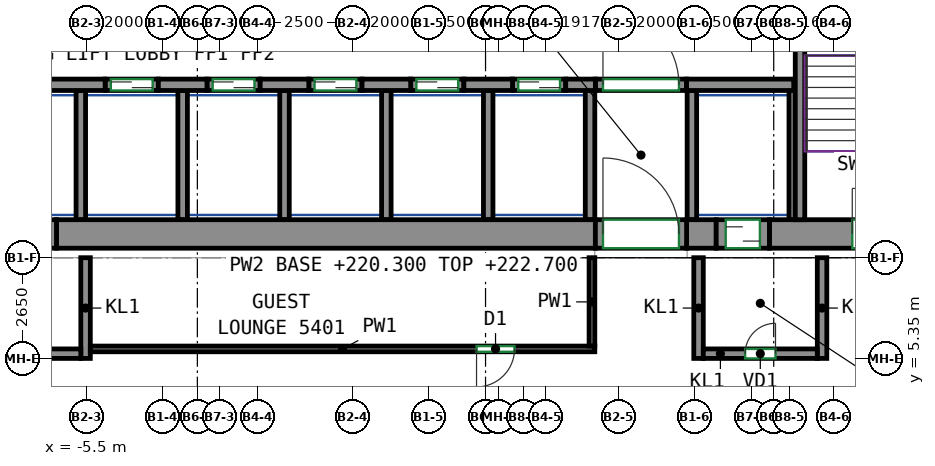
"""IFC4 building model, lengths in metres.
Left out: names, types, materials, properties, quantities, classifications, styles, units other than length and angle.
Written with IfcOpenShell. Run it as: python <this file> out.ifc"""

import sys

from ifc_helpers import new_model, si_unit, direction, frame, frame_2d, origin, place, context, subcontext, project, spatial, rectangle, extrude, source, transform, mapped, element, fill, save


model = new_model("IFC4")
c1 = context("Model", 3, precision=1e-05, world=origin(), true_north=direction((0.0, 1.0)))
c2 = subcontext(c1, "Body", "Model", "MODEL_VIEW")
j1 = project(units=[si_unit("LENGTHUNIT", "METRE"), si_unit("PLANEANGLEUNIT", "RADIAN")], contexts=[c1])
p1 = place(None, origin())
s1 = spatial("IfcSite", under=j1, at=p1, CompositionType="ELEMENT")
p2 = place(p1, origin())
s2 = spatial("IfcBuilding", under=s1, at=p2, CompositionType="ELEMENT")
p3 = place(p2, frame((0.0, 0.0, 220.3)))
s3 = spatial("IfcBuildingStorey", under=s2, at=p3, CompositionType="ELEMENT", Elevation=220.3)
m1 = source(origin(), c2, "Body", "SweptSolid", [
    extrude(rectangle(XDim=14.18, YDim=0.75, at=frame_2d((7.09, 0.0))), origin(), (0.0, 0.0, 1.0), 3.0),
])
p4 = place(p3, frame((-6.29, 8.625, 0.0), z_axis=(0.0, 0.0, 1.0), x_axis=(1.0, 0.0, 0.0)))
e1 = element("IfcWall", 1, at=p4, inside=s3, PredefinedType="SHEAR", context=c2, shape_type="MappedRepresentation", body=[
    mapped(m1, transform((0.0, 0.0, 0.0))),
])
m2 = source(origin(), c2, "Body", "SweptSolid", [
    extrude(rectangle(XDim=0.78, YDim=0.75, at=frame_2d((0.39, 0.0))), origin(), (0.0, 0.0, 1.0), 3.0),
])
p5 = place(p3, frame((10.29, 8.625, 0.0), z_axis=(0.0, 0.0, 1.0), x_axis=(1.0, 0.0, 0.0)))
e2 = element("IfcWall", 2, at=p5, inside=s3, PredefinedType="SHEAR", context=c2, shape_type="MappedRepresentation", body=[
    mapped(m2, transform((0.0, 0.0, 0.0))),
])
m3 = source(origin(), c2, "Body", "SweptSolid", [
    extrude(rectangle(XDim=5.38, YDim=0.75, at=frame_2d((2.69, 0.0))), origin(), (0.0, 0.0, 1.0), 3.0),
])
p6 = place(p3, frame((12.47, 8.625, 0.0), z_axis=(0.0, 0.0, 1.0), x_axis=(1.0, 0.0, 0.0)))
e3 = element("IfcWall", 3, at=p6, inside=s3, PredefinedType="SHEAR", context=c2, shape_type="MappedRepresentation", body=[
    mapped(m3, transform((0.0, 0.0, 0.0))),
])
p7 = place(p6, frame((2.18, 0.0, 0.0)))
e4 = element("IfcOpeningElement", 4, at=p7, cuts=e3, PredefinedType="OPENING", context=c2, shape_type="SweptSolid", body=[
    extrude(rectangle(XDim=1.2, YDim=2.1, at=frame_2d((0.6, 1.05))), frame((0.0, 0.385, 0.0), z_axis=(0.0, -1.0, 0.0), x_axis=(1.0, 0.0, 0.0)), (0.0, 0.0, 1.0), 0.77),
])
m4 = source(origin(), c2, "Body", "SweptSolid", [
    extrude(rectangle(XDim=7.75, YDim=0.25, at=frame_2d((3.875, 0.0))), origin(), (0.0, 0.0, 1.0), 3.0),
])
p8 = place(p3, frame((13.275, 9.0, 0.0), z_axis=(0.0, 0.0, 1.0), x_axis=(0.0, 1.0, 0.0)))
e5 = element("IfcWall", 5, at=p8, inside=s3, PredefinedType="SHEAR", context=c2, shape_type="MappedRepresentation", body=[
    mapped(m4, transform((0.0, 0.0, 0.0))),
])
m5 = source(origin(), c2, "Body", "SweptSolid", [
    extrude(rectangle(XDim=6.0, YDim=0.3, at=frame_2d((3.0, 0.0))), origin(), (0.0, 0.0, 1.0), 3.0),
])
p9 = place(p3, frame((-11.01, 12.55, 0.0), z_axis=(0.0, 0.0, 1.0), x_axis=(1.0, 0.0, 0.0)))
e6 = element("IfcWall", 6, at=p9, inside=s3, PredefinedType="SHEAR", context=c2, shape_type="MappedRepresentation", body=[
    mapped(m5, transform((0.0, 0.0, 0.0))),
])
m6 = source(origin(), c2, "Body", "SweptSolid", [
    extrude(rectangle(XDim=1.28, YDim=0.3, at=frame_2d((0.64, 0.0))), origin(), (0.0, 0.0, 1.0), 3.0),
])
for number, where, z_axis, x_axis in (
    (7, (-3.61, 12.55, 0.0), (0.0, 0.0, 1.0), (1.0, 0.0, 0.0)),
    (8, (-0.93, 12.55, 0.0), (0.0, 0.0, 1.0), (1.0, 0.0, 0.0)),
    (9, (1.75, 12.55, 0.0), (0.0, 0.0, 1.0), (1.0, 0.0, 0.0)),
    (10, (4.43, 12.55, 0.0), (0.0, 0.0, 1.0), (1.0, 0.0, 0.0)),
):
    element("IfcWall", number, at=place(p3, frame(where, z_axis=z_axis, x_axis=x_axis)), inside=s3, PredefinedType="SHEAR", context=c2, shape_type="MappedRepresentation", body=[
        mapped(m6, transform((0.0, 0.0, 0.0))),
    ])
m7 = source(origin(), c2, "Body", "SweptSolid", [
    extrude(rectangle(XDim=0.78, YDim=0.3, at=frame_2d((0.39, 0.0))), origin(), (0.0, 0.0, 1.0), 3.0),
])
p10 = place(p3, frame((7.11, 12.55, 0.0), z_axis=(0.0, 0.0, 1.0), x_axis=(1.0, 0.0, 0.0)))
e11 = element("IfcWall", 11, at=p10, inside=s3, PredefinedType="SHEAR", context=c2, shape_type="MappedRepresentation", body=[
    mapped(m7, transform((0.0, 0.0, 0.0))),
])
m8 = source(origin(), c2, "Body", "SweptSolid", [
    extrude(rectangle(XDim=2.82, YDim=0.3, at=frame_2d((1.41, 0.0))), origin(), (0.0, 0.0, 1.0), 3.0),
])
p11 = place(p3, frame((10.29, 12.55, 0.0), z_axis=(0.0, 0.0, 1.0), x_axis=(1.0, 0.0, 0.0)))
e12 = element("IfcWall", 12, at=p11, inside=s3, PredefinedType="SHEAR", context=c2, shape_type="MappedRepresentation", body=[
    mapped(m8, transform((0.0, 0.0, 0.0))),
])
m9 = source(origin(), c2, "Body", "SweptSolid", [
    extrude(rectangle(XDim=1.4, YDim=0.3, at=frame_2d((0.7, 0.0))), origin(), (0.0, 0.0, 1.0), 3.0),
])
p12 = place(p3, frame((-5.01, 12.55, 0.0), z_axis=(0.0, 0.0, 1.0), x_axis=(1.0, 0.0, 0.0)))
e13 = element("IfcWall", 13, at=p12, inside=s3, PredefinedType="PARTITIONING", context=c2, shape_type="MappedRepresentation", body=[
    mapped(m9, transform((0.0, 0.0, 0.0))),
])
p13 = place(p12, frame((0.15, 0.0, 0.0)))
e14 = element("IfcOpeningElement", 14, at=p13, cuts=e13, PredefinedType="OPENING", context=c2, shape_type="SweptSolid", body=[
    extrude(rectangle(XDim=1.1, YDim=2.1, at=frame_2d((0.55, 1.05))), frame((0.0, 0.16, 0.0), z_axis=(0.0, -1.0, 0.0), x_axis=(1.0, 0.0, 0.0)), (0.0, 0.0, 1.0), 0.32),
])
m10 = source(origin(), c2, "Body", "SweptSolid", [
    extrude(rectangle(XDim=1.4, YDim=0.3, at=frame_2d((0.7, 0.0))), origin(), (0.0, 0.0, 1.0), 3.0),
])
p14 = place(p3, frame((-2.33, 12.55, 0.0), z_axis=(0.0, 0.0, 1.0), x_axis=(1.0, 0.0, 0.0)))
e15 = element("IfcWall", 15, at=p14, inside=s3, PredefinedType="PARTITIONING", context=c2, shape_type="MappedRepresentation", body=[
    mapped(m10, transform((0.0, 0.0, 0.0))),
])
p15 = place(p14, frame((0.15, 0.0, 0.0)))
e16 = element("IfcOpeningElement", 16, at=p15, cuts=e15, PredefinedType="OPENING", context=c2, shape_type="SweptSolid", body=[
    extrude(rectangle(XDim=1.1, YDim=2.1, at=frame_2d((0.55, 1.05))), frame((0.0, 0.16, 0.0), z_axis=(0.0, -1.0, 0.0), x_axis=(1.0, 0.0, 0.0)), (0.0, 0.0, 1.0), 0.32),
])
p16 = place(p3, frame((0.35, 12.55, 0.0), z_axis=(0.0, 0.0, 1.0), x_axis=(1.0, 0.0, 0.0)))
e17 = element("IfcWall", 17, at=p16, inside=s3, PredefinedType="PARTITIONING", context=c2, shape_type="MappedRepresentation", body=[
    mapped(m9, transform((0.0, 0.0, 0.0))),
])
p17 = place(p16, frame((0.15, 0.0, 0.0)))
e18 = element("IfcOpeningElement", 18, at=p17, cuts=e17, PredefinedType="OPENING", context=c2, shape_type="SweptSolid", body=[
    extrude(rectangle(XDim=1.1, YDim=2.1, at=frame_2d((0.55, 1.05))), frame((0.0, 0.16, 0.0), z_axis=(0.0, -1.0, 0.0), x_axis=(1.0, 0.0, 0.0)), (0.0, 0.0, 1.0), 0.32),
])
p18 = place(p3, frame((3.03, 12.55, 0.0), z_axis=(0.0, 0.0, 1.0), x_axis=(1.0, 0.0, 0.0)))
e19 = element("IfcWall", 19, at=p18, inside=s3, PredefinedType="PARTITIONING", context=c2, shape_type="MappedRepresentation", body=[
    mapped(m9, transform((0.0, 0.0, 0.0))),
])
p19 = place(p18, frame((0.15, 0.0, 0.0)))
e20 = element("IfcOpeningElement", 20, at=p19, cuts=e19, PredefinedType="OPENING", context=c2, shape_type="SweptSolid", body=[
    extrude(rectangle(XDim=1.1, YDim=2.1, at=frame_2d((0.55, 1.05))), frame((0.0, 0.16, 0.0), z_axis=(0.0, -1.0, 0.0), x_axis=(1.0, 0.0, 0.0)), (0.0, 0.0, 1.0), 0.32),
])
p20 = place(p3, frame((5.71, 12.55, 0.0), z_axis=(0.0, 0.0, 1.0), x_axis=(1.0, 0.0, 0.0)))
e21 = element("IfcWall", 21, at=p20, inside=s3, PredefinedType="PARTITIONING", context=c2, shape_type="MappedRepresentation", body=[
    mapped(m10, transform((0.0, 0.0, 0.0))),
])
p21 = place(p20, frame((0.15, 0.0, 0.0)))
e22 = element("IfcOpeningElement", 22, at=p21, cuts=e21, PredefinedType="OPENING", context=c2, shape_type="SweptSolid", body=[
    extrude(rectangle(XDim=1.1, YDim=2.1, at=frame_2d((0.55, 1.05))), frame((0.0, 0.16, 0.0), z_axis=(0.0, -1.0, 0.0), x_axis=(1.0, 0.0, 0.0)), (0.0, 0.0, 1.0), 0.32),
])
m11 = source(origin(), c2, "Body", "SweptSolid", [
    extrude(rectangle(XDim=2.4, YDim=0.3, at=frame_2d((1.2, 0.0))), origin(), (0.0, 0.0, 1.0), 3.0),
])
p22 = place(p3, frame((7.89, 12.55, 0.0), z_axis=(0.0, 0.0, 1.0), x_axis=(1.0, 0.0, 0.0)))
e23 = element("IfcWall", 23, at=p22, inside=s3, PredefinedType="PARTITIONING", context=c2, shape_type="MappedRepresentation", body=[
    mapped(m11, transform((0.0, 0.0, 0.0))),
])
p23 = place(p22, frame((0.2, 0.0, 0.0)))
e24 = element("IfcOpeningElement", 24, at=p23, cuts=e23, PredefinedType="OPENING", context=c2, shape_type="SweptSolid", body=[
    extrude(rectangle(XDim=2.0, YDim=2.1, at=frame_2d((1.0, 1.05))), frame((0.0, 0.16, 0.0), z_axis=(0.0, -1.0, 0.0), x_axis=(1.0, 0.0, 0.0)), (0.0, 0.0, 1.0), 0.32),
])
m12 = source(origin(), c2, "Body", "SweptSolid", [
    extrude(rectangle(XDim=2.65, YDim=0.25, at=frame_2d((1.325, 0.0))), origin(), (0.0, 0.0, 1.0), 3.0),
])
p24 = place(p3, frame((-5.525, 5.35, 0.0), z_axis=(0.0, 0.0, 1.0), x_axis=(0.0, 1.0, 0.0)))
e25 = element("IfcWall", 25, at=p24, inside=s3, PredefinedType="PARTITIONING", context=c2, shape_type="MappedRepresentation", body=[
    mapped(m12, transform((0.0, 0.0, 0.0))),
])
m13 = source(origin(), c2, "Body", "SweptSolid", [
    extrude(rectangle(XDim=5.36, YDim=0.25, at=frame_2d((2.68, 0.0))), origin(), (0.0, 0.0, 1.0), 3.0),
])
p25 = place(p3, frame((-11.01, 5.475, 0.0), z_axis=(0.0, 0.0, 1.0), x_axis=(1.0, 0.0, 0.0)))
e26 = element("IfcWall", 26, at=p25, inside=s3, PredefinedType="PARTITIONING", context=c2, shape_type="MappedRepresentation", body=[
    mapped(m13, transform((0.0, 0.0, 0.0))),
])
p26 = place(p25, frame((2.28, 0.0, 0.0)))
e27 = element("IfcOpeningElement", 27, at=p26, cuts=e26, PredefinedType="OPENING", context=c2, shape_type="SweptSolid", body=[
    extrude(rectangle(XDim=0.8, YDim=2.0, at=frame_2d((0.4, 1.0))), frame((0.0, 0.135, 0.0), z_axis=(0.0, -1.0, 0.0), x_axis=(1.0, 0.0, 0.0)), (0.0, 0.0, 1.0), 0.27),
])
for number, where, z_axis, x_axis in (
    (28, (10.605, 5.35, 0.0), (0.0, 0.0, 1.0), (0.0, 1.0, 0.0)),
    (29, (13.855, 5.35, 0.0), (0.0, 0.0, 1.0), (0.0, 1.0, 0.0)),
):
    element("IfcWall", number, at=place(p3, frame(where, z_axis=z_axis, x_axis=x_axis)), inside=s3, PredefinedType="PARTITIONING", context=c2, shape_type="MappedRepresentation", body=[
        mapped(m12, transform((0.0, 0.0, 0.0))),
    ])
m14 = source(origin(), c2, "Body", "SweptSolid", [
    extrude(rectangle(XDim=3.0, YDim=0.25, at=frame_2d((1.5, 0.0))), origin(), (0.0, 0.0, 1.0), 3.0),
])
p27 = place(p3, frame((10.73, 5.475, 0.0), z_axis=(0.0, 0.0, 1.0), x_axis=(1.0, 0.0, 0.0)))
e30 = element("IfcWall", 30, at=p27, inside=s3, PredefinedType="PARTITIONING", context=c2, shape_type="MappedRepresentation", body=[
    mapped(m14, transform((0.0, 0.0, 0.0))),
])
p28 = place(p27, frame((1.1, 0.0, 0.0)))
e31 = element("IfcOpeningElement", 31, at=p28, cuts=e30, PredefinedType="OPENING", context=c2, shape_type="SweptSolid", body=[
    extrude(rectangle(XDim=0.8, YDim=2.0, at=frame_2d((0.4, 1.0))), frame((0.0, 0.135, 0.0), z_axis=(0.0, -1.0, 0.0), x_axis=(1.0, 0.0, 0.0)), (0.0, 0.0, 1.0), 0.27),
])
m15 = source(origin(), c2, "Body", "SweptSolid", [
    extrude(rectangle(XDim=3.4, YDim=0.25, at=frame_2d((1.7, 0.0))), origin(), (0.0, 0.0, 1.0), 3.0),
])
p29 = place(p3, frame((10.43, 9.0, 0.0), z_axis=(0.0, 0.0, 1.0), x_axis=(0.0, 1.0, 0.0)))
e32 = element("IfcWall", 32, at=p29, inside=s3, PredefinedType="PARTITIONING", context=c2, shape_type="MappedRepresentation", body=[
    mapped(m15, transform((0.0, 0.0, 0.0))),
])
m16 = source(origin(), c2, "Body", "SweptSolid", [
    extrude(rectangle(XDim=3.4, YDim=0.165, at=frame_2d((1.7, 0.0))), origin(), (0.0, 0.0, 1.0), 3.0),
])
p30 = place(p3, frame((13.067, 9.0, 0.0), z_axis=(0.0, 0.0, 1.0), x_axis=(0.0, 1.0, 0.0)))
e33 = element("IfcWall", 33, at=p30, inside=s3, PredefinedType="PARTITIONING", context=c2, shape_type="MappedRepresentation", body=[
    mapped(m16, transform((0.0, 0.0, 0.0))),
])
for number, where, z_axis, x_axis in (
    (34, (2.39, 9.0, 0.0), (0.0, 0.0, 1.0), (0.0, 1.0, 0.0)),
    (35, (5.07, 9.0, 0.0), (0.0, 0.0, 1.0), (0.0, 1.0, 0.0)),
    (36, (7.75, 9.0, 0.0), (0.0, 0.0, 1.0), (0.0, 1.0, 0.0)),
    (37, (-0.29, 9.0, 0.0), (0.0, 0.0, 1.0), (0.0, 1.0, 0.0)),
    (38, (-2.97, 9.0, 0.0), (0.0, 0.0, 1.0), (0.0, 1.0, 0.0)),
    (39, (-5.65, 9.0, 0.0), (0.0, 0.0, 1.0), (0.0, 1.0, 0.0)),
):
    element("IfcWall", number, at=place(p3, frame(where, z_axis=z_axis, x_axis=x_axis)), inside=s3, PredefinedType="PARTITIONING", context=c2, shape_type="MappedRepresentation", body=[
        mapped(m15, transform((0.0, 0.0, 0.0))),
    ])
m17 = source(origin(), c2, "Body", "SweptSolid", [
    extrude(rectangle(XDim=1.4, YDim=0.75, at=frame_2d((0.7, 0.0))), origin(), (0.0, 0.0, 1.0), 2.7),
])
p31 = place(p3, frame((-7.69, 8.625, 0.0), z_axis=(0.0, 0.0, 1.0), x_axis=(1.0, 0.0, 0.0)))
e40 = element("IfcWall", 40, at=p31, inside=s3, PredefinedType="PARTITIONING", context=c2, shape_type="MappedRepresentation", body=[
    mapped(m17, transform((0.0, 0.0, 0.0))),
])
p32 = place(p31, frame((0.25, 0.0, 0.0)))
e41 = element("IfcOpeningElement", 41, at=p32, cuts=e40, PredefinedType="OPENING", context=c2, shape_type="SweptSolid", body=[
    extrude(rectangle(XDim=0.9, YDim=2.1, at=frame_2d((0.45, 1.05))), frame((0.0, 0.385, 0.0), z_axis=(0.0, -1.0, 0.0), x_axis=(1.0, 0.0, 0.0)), (0.0, 0.0, 1.0), 0.77),
])
m18 = source(origin(), c2, "Body", "SweptSolid", [
    extrude(rectangle(XDim=2.4, YDim=0.75, at=frame_2d((1.2, 0.0))), origin(), (0.0, 0.0, 1.0), 2.7),
])
p33 = place(p3, frame((7.89, 8.625, 0.0), z_axis=(0.0, 0.0, 1.0), x_axis=(1.0, 0.0, 0.0)))
e42 = element("IfcWall", 42, at=p33, inside=s3, PredefinedType="PARTITIONING", context=c2, shape_type="MappedRepresentation", body=[
    mapped(m18, transform((0.0, 0.0, 0.0))),
])
p34 = place(p33, frame((0.2, 0.0, 0.0)))
e43 = element("IfcOpeningElement", 43, at=p34, cuts=e42, PredefinedType="OPENING", context=c2, shape_type="SweptSolid", body=[
    extrude(rectangle(XDim=2.0, YDim=2.1, at=frame_2d((1.0, 1.05))), frame((0.0, 0.385, 0.0), z_axis=(0.0, -1.0, 0.0), x_axis=(1.0, 0.0, 0.0)), (0.0, 0.0, 1.0), 0.77),
])
p35 = place(p3, frame((11.07, 8.625, 0.0), z_axis=(0.0, 0.0, 1.0), x_axis=(1.0, 0.0, 0.0)))
e44 = element("IfcWall", 44, at=p35, inside=s3, PredefinedType="PARTITIONING", context=c2, shape_type="MappedRepresentation", body=[
    mapped(m17, transform((0.0, 0.0, 0.0))),
])
p36 = place(p35, frame((0.25, 0.0, 0.0)))
e45 = element("IfcOpeningElement", 45, at=p36, cuts=e44, PredefinedType="OPENING", context=c2, shape_type="SweptSolid", body=[
    extrude(rectangle(XDim=0.9, YDim=2.1, at=frame_2d((0.45, 1.05))), frame((0.0, 0.385, 0.0), z_axis=(0.0, -1.0, 0.0), x_axis=(1.0, 0.0, 0.0)), (0.0, 0.0, 1.0), 0.77),
])
p37 = place(p3, frame((7.875, 5.6, 0.0), z_axis=(0.0, 0.0, 1.0), x_axis=(-1.0, 0.0, 0.0)))
e46 = element("IfcWall", 46, at=p37, inside=s3, PredefinedType="PARTITIONING", context=c2, shape_type="SweptSolid", body=[
    extrude(rectangle(XDim=13.275, YDim=0.15, at=frame_2d((6.637, 0.0))), origin(), (0.0, 0.0, 1.0), 3.0),
])
p38 = place(p37, frame((2.112, 0.0, 0.0)))
e47 = element("IfcOpeningElement", 47, at=p38, cuts=e46, PredefinedType="OPENING", context=c2, shape_type="SweptSolid", body=[
    extrude(rectangle(XDim=1.0, YDim=2.1, at=frame_2d((0.5, 1.05))), frame((0.0, 0.085, 0.0), z_axis=(0.0, -1.0, 0.0), x_axis=(1.0, 0.0, 0.0)), (0.0, 0.0, 1.0), 0.17),
])
p39 = place(p3, frame((7.8, 8.0, 0.0), z_axis=(0.0, 0.0, 1.0), x_axis=(0.0, -1.0, 0.0)))
e48 = element("IfcWall", 48, at=p39, inside=s3, PredefinedType="PARTITIONING", context=c2, shape_type="SweptSolid", body=[
    extrude(rectangle(XDim=2.325, YDim=0.15, at=frame_2d((1.163, 0.0))), origin(), (0.0, 0.0, 1.0), 3.0),
])
p40 = place(p23, origin())
e49 = element("IfcDoor", 49, at=p40, inside=s3, OperationType="DOUBLE_DOOR_SINGLE_SWING", PredefinedType="DOOR", context=c2, shape_type="SweptSolid", body=[
    extrude(rectangle(XDim=2.0, YDim=2.1, at=frame_2d((1.0, 1.05))), frame((0.0, 0.025, 0.0), z_axis=(0.0, -1.0, 0.0), x_axis=(1.0, 0.0, 0.0)), (0.0, 0.0, 1.0), 0.05),
])
fill(e24, e49)
p41 = place(p34, origin())
e50 = element("IfcDoor", 50, at=p41, inside=s3, OperationType="DOUBLE_DOOR_SINGLE_SWING", PredefinedType="DOOR", context=c2, shape_type="SweptSolid", body=[
    extrude(rectangle(XDim=2.0, YDim=2.1, at=frame_2d((1.0, 1.05))), frame((0.0, 0.28, 0.0), z_axis=(0.0, -1.0, 0.0), x_axis=(1.0, 0.0, 0.0)), (0.0, 0.0, 1.0), 0.05),
])
fill(e43, e50)
p42 = place(p28, origin())
e51 = element("IfcDoor", 51, at=p42, inside=s3, OperationType="SINGLE_SWING_RIGHT", PredefinedType="DOOR", context=c2, shape_type="SweptSolid", body=[
    extrude(rectangle(XDim=0.8, YDim=2.0, at=frame_2d((0.4, 1.0))), frame((0.0, 0.025, 0.0), z_axis=(0.0, -1.0, 0.0), x_axis=(1.0, 0.0, 0.0)), (0.0, 0.0, 1.0), 0.05),
])
fill(e31, e51)
p43 = place(p36, origin())
e52 = element("IfcDoor", 52, at=p43, inside=s3, OperationType="SLIDING_TO_LEFT", PredefinedType="DOOR", context=c2, shape_type="SweptSolid", body=[
    extrude(rectangle(XDim=0.9, YDim=2.1, at=frame_2d((0.45, 1.05))), frame((0.0, 0.28, 0.0), z_axis=(0.0, -1.0, 0.0), x_axis=(1.0, 0.0, 0.0)), (0.0, 0.0, 1.0), 0.05),
])
fill(e45, e52)
p44 = place(p13, origin())
e53 = element("IfcDoor", 53, at=p44, inside=s3, OperationType="DOUBLE_DOOR_SLIDING", PredefinedType="DOOR", context=c2, shape_type="SweptSolid", body=[
    extrude(rectangle(XDim=1.1, YDim=2.1, at=frame_2d((0.55, 1.05))), frame((0.0, 0.025, 0.0), z_axis=(0.0, -1.0, 0.0), x_axis=(1.0, 0.0, 0.0)), (0.0, 0.0, 1.0), 0.05),
])
fill(e14, e53)
p45 = place(p15, origin())
e54 = element("IfcDoor", 54, at=p45, inside=s3, OperationType="DOUBLE_DOOR_SLIDING", PredefinedType="DOOR", context=c2, shape_type="SweptSolid", body=[
    extrude(rectangle(XDim=1.1, YDim=2.1, at=frame_2d((0.55, 1.05))), frame((0.0, 0.025, 0.0), z_axis=(0.0, -1.0, 0.0), x_axis=(1.0, 0.0, 0.0)), (0.0, 0.0, 1.0), 0.05),
])
fill(e16, e54)
p46 = place(p17, origin())
e55 = element("IfcDoor", 55, at=p46, inside=s3, OperationType="DOUBLE_DOOR_SLIDING", PredefinedType="DOOR", context=c2, shape_type="SweptSolid", body=[
    extrude(rectangle(XDim=1.1, YDim=2.1, at=frame_2d((0.55, 1.05))), frame((0.0, 0.025, 0.0), z_axis=(0.0, -1.0, 0.0), x_axis=(1.0, 0.0, 0.0)), (0.0, 0.0, 1.0), 0.05),
])
fill(e18, e55)
p47 = place(p19, origin())
e56 = element("IfcDoor", 56, at=p47, inside=s3, OperationType="DOUBLE_DOOR_SLIDING", PredefinedType="DOOR", context=c2, shape_type="SweptSolid", body=[
    extrude(rectangle(XDim=1.1, YDim=2.1, at=frame_2d((0.55, 1.05))), frame((0.0, 0.025, 0.0), z_axis=(0.0, -1.0, 0.0), x_axis=(1.0, 0.0, 0.0)), (0.0, 0.0, 1.0), 0.05),
])
fill(e20, e56)
p48 = place(p21, origin())
e57 = element("IfcDoor", 57, at=p48, inside=s3, OperationType="DOUBLE_DOOR_SLIDING", PredefinedType="DOOR", context=c2, shape_type="SweptSolid", body=[
    extrude(rectangle(XDim=1.1, YDim=2.1, at=frame_2d((0.55, 1.05))), frame((0.0, 0.025, 0.0), z_axis=(0.0, -1.0, 0.0), x_axis=(1.0, 0.0, 0.0)), (0.0, 0.0, 1.0), 0.05),
])
fill(e22, e57)
p49 = place(p7, origin())
e58 = element("IfcDoor", 58, at=p49, inside=s3, OperationType="DOUBLE_DOOR_SINGLE_SWING", PredefinedType="DOOR", context=c2, shape_type="SweptSolid", body=[
    extrude(rectangle(XDim=1.2, YDim=2.1, at=frame_2d((0.6, 1.05))), frame((0.0, 0.28, 0.0), z_axis=(0.0, -1.0, 0.0), x_axis=(1.0, 0.0, 0.0)), (0.0, 0.0, 1.0), 0.05),
])
fill(e4, e58)
p50 = place(p38, origin())
e59 = element("IfcDoor", 59, at=p50, inside=s3, OperationType="SINGLE_SWING_RIGHT", PredefinedType="DOOR", context=c2, shape_type="SweptSolid", body=[
    extrude(rectangle(XDim=1.0, YDim=2.1, at=frame_2d((0.5, 1.05))), frame((0.0, 0.025, 0.0), z_axis=(0.0, -1.0, 0.0), x_axis=(1.0, 0.0, 0.0)), (0.0, 0.0, 1.0), 0.05),
])
fill(e47, e59)
save(model, sys.argv[1])
